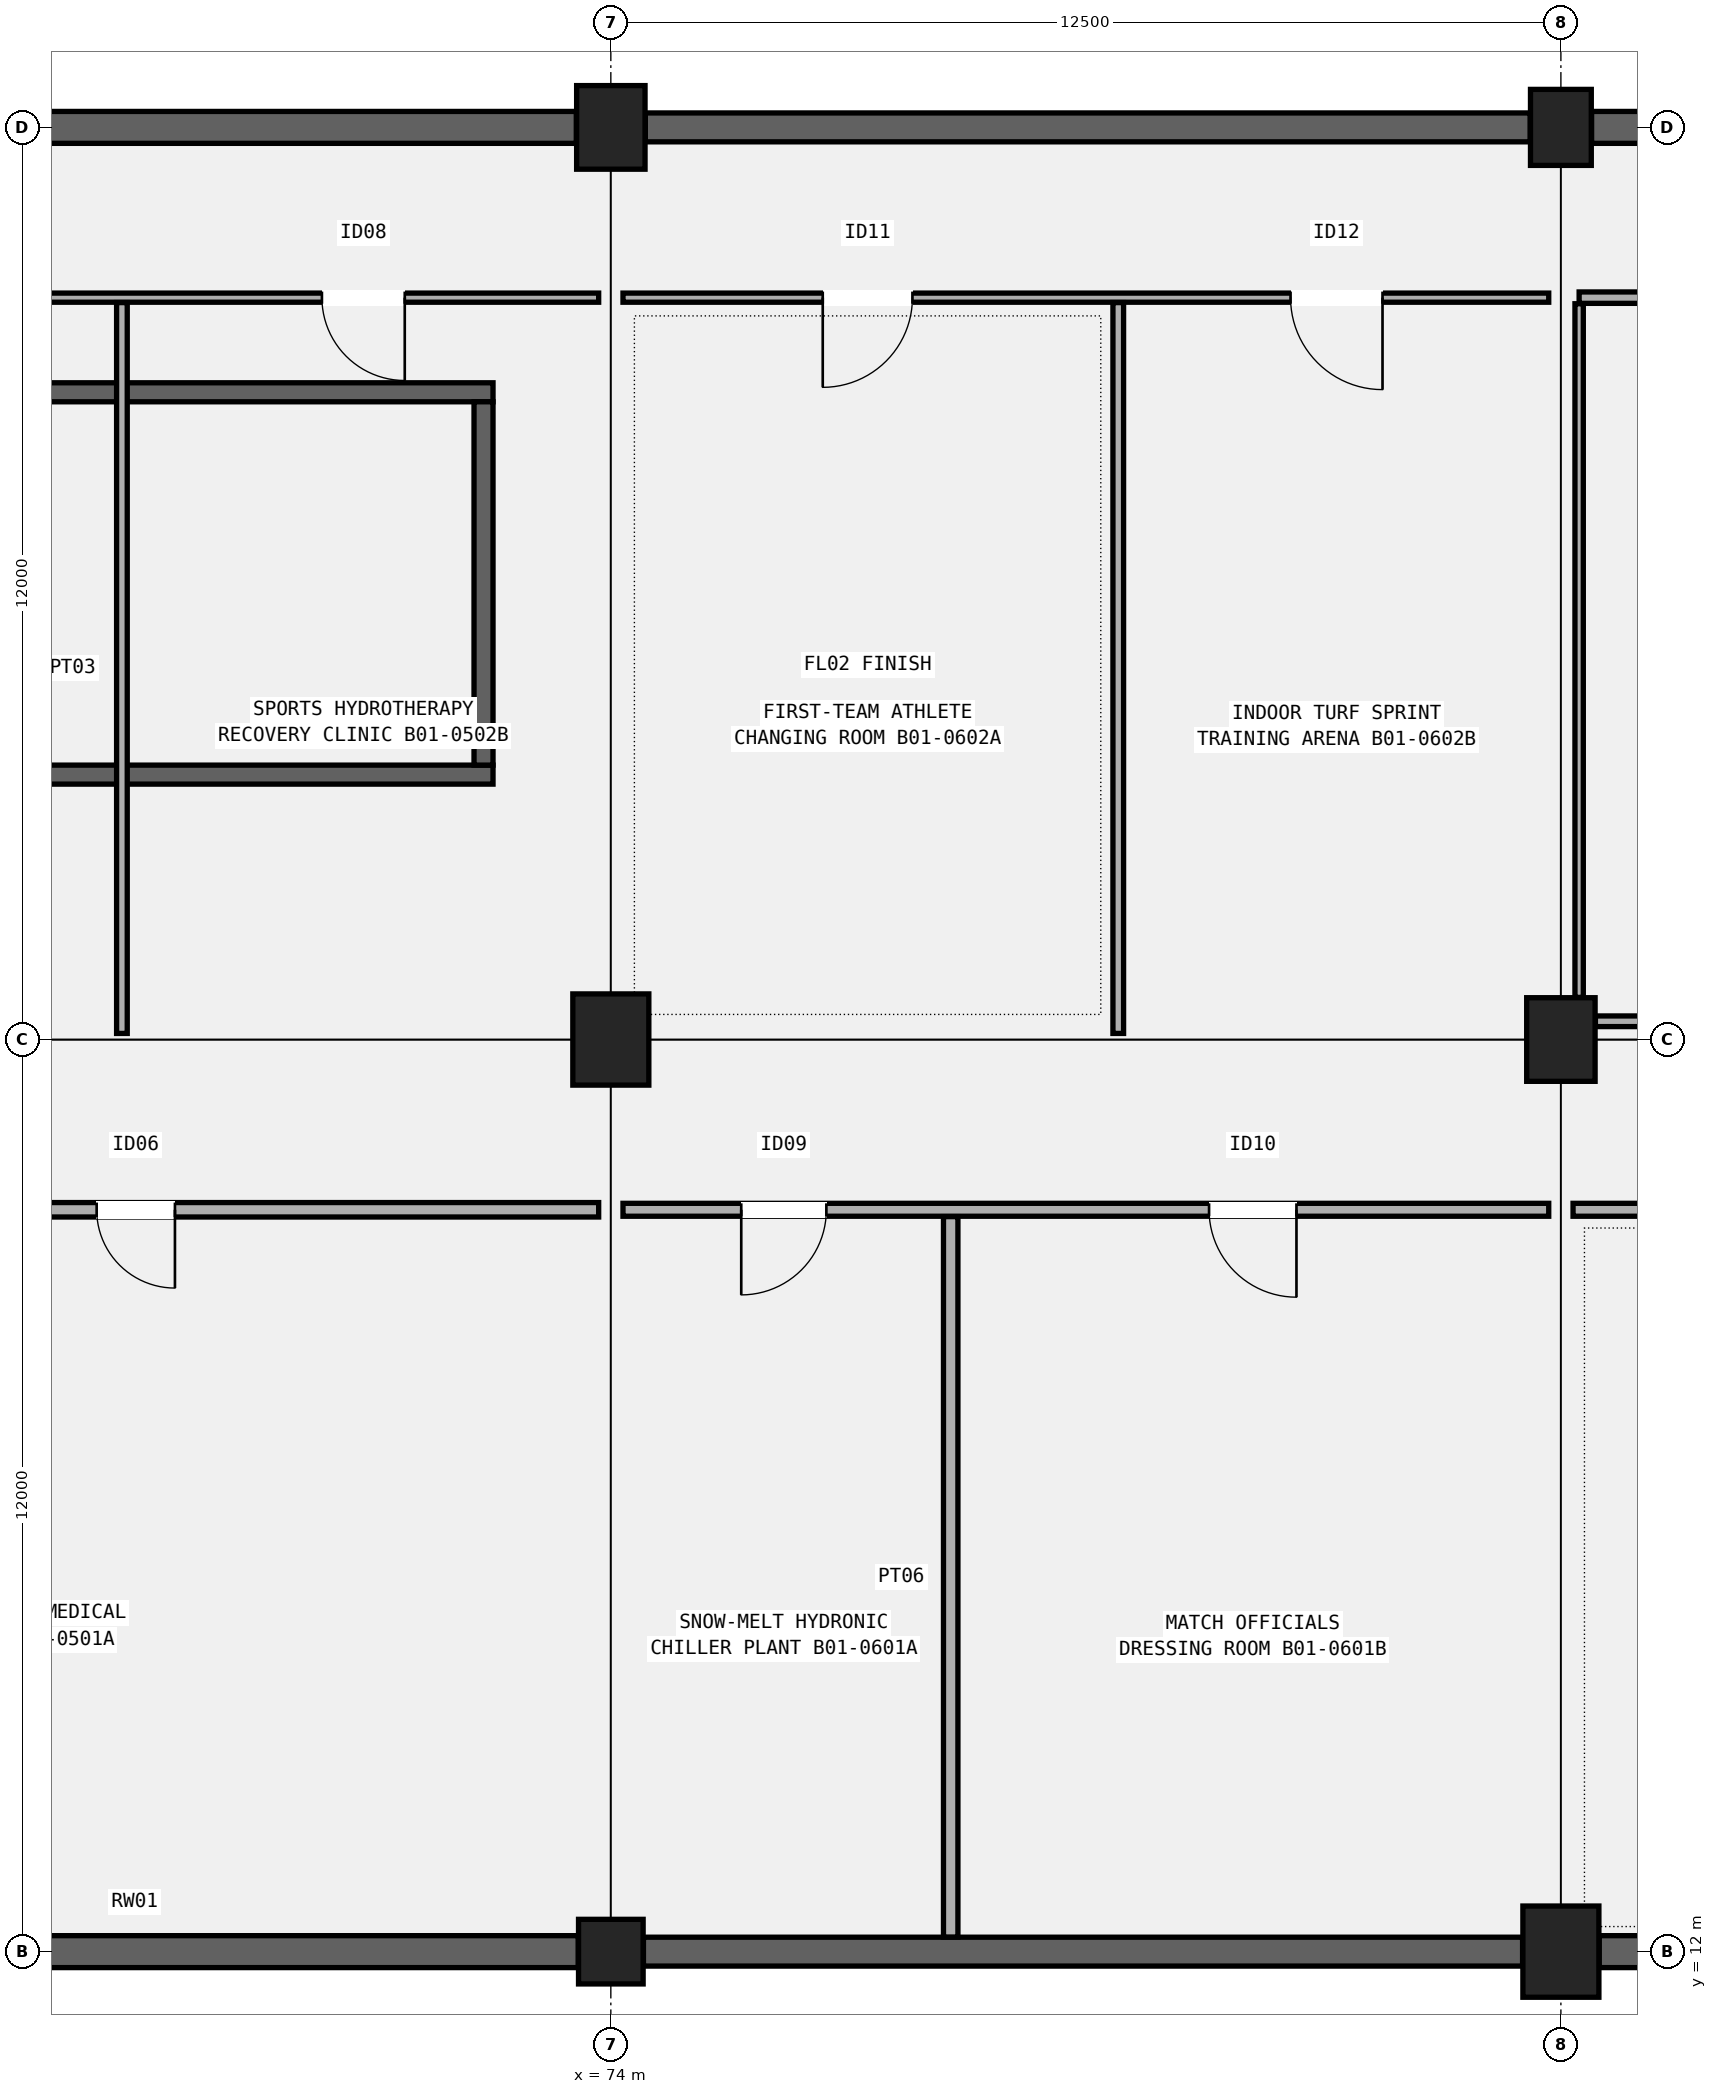
"""IFC4 building model, lengths in metres.
Left out: names, types, materials, properties, quantities, classifications, styles, units other than length and angle.
Written with IfcOpenShell. Run it as: python <this file> out.ifc"""

import sys

from ifc_helpers import new_model, si_unit, direction, frame, frame_2d, origin, origin_2d, place, context, subcontext, project, spatial, rectangle, circle, extrude, element, fill, save


model = new_model("IFC4")
c1 = context("Model", 3, precision=1e-05, world=origin(), true_north=direction((0.0, 1.0)))
c2 = subcontext(c1, "Body", "Model", "MODEL_VIEW")
j1 = project(units=[si_unit("LENGTHUNIT", "METRE"), si_unit("PLANEANGLEUNIT", "RADIAN")], contexts=[c1])
p1 = place(None, origin())
s1 = spatial("IfcSite", under=j1, at=p1, CompositionType="ELEMENT")
p2 = place(p1, origin())
s2 = spatial("IfcBuilding", under=s1, at=p2, CompositionType="ELEMENT")
p3 = place(p2, frame((0.0, 0.0, -4.8)))
s3 = spatial("IfcBuildingStorey", under=s2, at=p3, CompositionType="ELEMENT", Elevation=-4.8)
p4 = place(p3, frame((74.0, 12.0, 0.0), z_axis=(0.0, 0.0, 1.0), x_axis=(1.0, 0.0, 0.0)))
e1 = element("IfcColumn", 1, at=p4, inside=s3, PredefinedType="COLUMN", context=c2, shape_type="SweptSolid", body=[
    extrude(circle(Radius=0.425, at=origin_2d()), origin(), (0.0, 0.0, 1.0), 4.8),
])
p5 = place(p3, frame((74.0, 24.0, 0.0), z_axis=(0.0, 0.0, 1.0), x_axis=(1.0, 0.0, 0.0)))
e2 = element("IfcColumn", 2, at=p5, inside=s3, PredefinedType="COLUMN", context=c2, shape_type="SweptSolid", body=[
    extrude(rectangle(XDim=1.0, YDim=1.2, at=origin_2d()), origin(), (0.0, 0.0, 1.0), 4.8),
])
p6 = place(p3, frame((74.0, 36.0, 0.0), z_axis=(0.0, 0.0, 1.0), x_axis=(1.0, 0.0, 0.0)))
e3 = element("IfcColumn", 3, at=p6, inside=s3, PredefinedType="COLUMN", context=c2, shape_type="SweptSolid", body=[
    extrude(rectangle(XDim=0.9, YDim=1.1, at=origin_2d()), origin(), (0.0, 0.0, 1.0), 4.8),
])
p7 = place(p3, frame((86.5, 12.0, 0.0), z_axis=(0.0, 0.0, 1.0), x_axis=(1.0, 0.0, 0.0)))
e4 = element("IfcColumn", 4, at=p7, inside=s3, PredefinedType="COLUMN", context=c2, shape_type="SweptSolid", body=[
    extrude(rectangle(XDim=1.0, YDim=1.2, at=origin_2d()), origin(), (0.0, 0.0, 1.0), 4.8),
])
p8 = place(p3, frame((86.5, 24.0, 0.0), z_axis=(0.0, 0.0, 1.0), x_axis=(1.0, 0.0, 0.0)))
e5 = element("IfcColumn", 5, at=p8, inside=s3, PredefinedType="COLUMN", context=c2, shape_type="SweptSolid", body=[
    extrude(rectangle(XDim=0.9, YDim=1.1, at=origin_2d()), origin(), (0.0, 0.0, 1.0), 4.8),
])
p9 = place(p3, frame((86.5, 36.0, 0.0), z_axis=(0.0, 0.0, 1.0), x_axis=(1.0, 0.0, 0.0)))
e6 = element("IfcColumn", 6, at=p9, inside=s3, PredefinedType="COLUMN", context=c2, shape_type="SweptSolid", body=[
    extrude(rectangle(XDim=0.8, YDim=1.0, at=origin_2d()), origin(), (0.0, 0.0, 1.0), 4.8),
])
p10 = place(p3, frame((61.904, 12.0, 0.0), z_axis=(0.0, 0.0, 1.0), x_axis=(1.0, 0.0, 0.0)))
e7 = element("IfcWall", 7, at=p10, inside=s3, PredefinedType="STANDARD", context=c2, shape_type="SweptSolid", body=[
    extrude(rectangle(XDim=11.667, YDim=0.42, at=frame_2d((5.833, 0.0))), origin(), (0.0, 0.0, 1.0), 4.46),
])
p11 = place(p3, frame((62.004, 36.0, 0.0), z_axis=(0.0, 0.0, 1.0), x_axis=(1.0, 0.0, 0.0)))
e8 = element("IfcWall", 8, at=p11, inside=s3, PredefinedType="STANDARD", context=c2, shape_type="SweptSolid", body=[
    extrude(rectangle(XDim=11.542, YDim=0.42, at=frame_2d((5.771, 0.0))), origin(), (0.0, 0.0, 1.0), 4.46),
])
p12 = place(p3, frame((74.429, 12.0, 0.0), z_axis=(0.0, 0.0, 1.0), x_axis=(1.0, 0.0, 0.0)))
e9 = element("IfcWall", 9, at=p12, inside=s3, PredefinedType="STANDARD", context=c2, shape_type="SweptSolid", body=[
    extrude(rectangle(XDim=11.567, YDim=0.38, at=frame_2d((5.784, 0.0))), origin(), (0.0, 0.0, 1.0), 4.46),
])
p13 = place(p3, frame((74.454, 36.0, 0.0), z_axis=(0.0, 0.0, 1.0), x_axis=(1.0, 0.0, 0.0)))
e10 = element("IfcWall", 10, at=p13, inside=s3, PredefinedType="STANDARD", context=c2, shape_type="SweptSolid", body=[
    extrude(rectangle(XDim=11.642, YDim=0.38, at=frame_2d((5.821, 0.0))), origin(), (0.0, 0.0, 1.0), 4.46),
])
p14 = place(p3, frame((87.004, 12.0, 0.0), z_axis=(0.0, 0.0, 1.0), x_axis=(1.0, 0.0, 0.0)))
e11 = element("IfcWall", 11, at=p14, inside=s3, PredefinedType="STANDARD", context=c2, shape_type="SweptSolid", body=[
    extrude(rectangle(XDim=11.542, YDim=0.42, at=frame_2d((5.771, 0.0))), origin(), (0.0, 0.0, 1.0), 4.46),
])
p15 = place(p3, frame((86.904, 36.0, 0.0), z_axis=(0.0, 0.0, 1.0), x_axis=(1.0, 0.0, 0.0)))
e12 = element("IfcWall", 12, at=p15, inside=s3, PredefinedType="STANDARD", context=c2, shape_type="SweptSolid", body=[
    extrude(rectangle(XDim=11.667, YDim=0.42, at=frame_2d((5.833, 0.0))), origin(), (0.0, 0.0, 1.0), 4.46),
])
for number, where, z_axis, x_axis in (
    (13, (63.05, 27.485, 0.0), (0.0, 0.0, 1.0), (1.0, 0.0, 0.0)),
    (14, (63.05, 32.515, 0.0), (0.0, 0.0, 1.0), (1.0, 0.0, 0.0)),
):
    element("IfcWall", number, at=place(p3, frame(where, z_axis=z_axis, x_axis=x_axis)), inside=s3, PredefinedType="SHEAR", context=c2, shape_type="SweptSolid", body=[
        extrude(rectangle(XDim=9.4, YDim=0.25, at=frame_2d((4.7, 0.0))), origin(), (0.0, 0.0, 1.0), 4.5),
    ])
p16 = place(p3, frame((72.325, 27.61, 0.0), z_axis=(0.0, 0.0, 1.0), x_axis=(0.0, 1.0, 0.0)))
e15 = element("IfcWall", 15, at=p16, inside=s3, PredefinedType="SHEAR", context=c2, shape_type="SweptSolid", body=[
    extrude(rectangle(XDim=4.78, YDim=0.25, at=frame_2d((2.39, 0.0))), origin(), (0.0, 0.0, 1.0), 4.5),
])
p17 = place(p3, frame((61.66, 21.76, 0.0), z_axis=(0.0, 0.0, 1.0), x_axis=(1.0, 0.0, 0.0)))
e16 = element("IfcWall", 16, at=p17, inside=s3, PredefinedType="PARTITIONING", context=c2, shape_type="SweptSolid", body=[
    extrude(rectangle(XDim=12.18, YDim=0.19, at=frame_2d((6.09, 0.0))), origin(), (0.0, 0.0, 1.0), 3.92),
])
p18 = place(p17, frame((6.605, 0.0, 0.0), z_axis=(0.0, 0.0, 1.0), x_axis=(-1.0, 0.0, 0.0)))
e17 = element("IfcOpeningElement", 17, at=p18, cuts=e16, PredefinedType="OPENING", context=c2, shape_type="SweptSolid", body=[
    extrude(rectangle(XDim=1.03, YDim=2.12, at=frame_2d((0.515, 1.06))), frame((0.0, 0.105, 0.0), z_axis=(0.0, -1.0, 0.0), x_axis=(1.0, 0.0, 0.0)), (0.0, 0.0, 1.0), 0.21),
])
p19 = place(p3, frame((61.66, 33.76, 0.0), z_axis=(0.0, 0.0, 1.0), x_axis=(1.0, 0.0, 0.0)))
e18 = element("IfcWall", 18, at=p19, inside=s3, PredefinedType="PARTITIONING", context=c2, shape_type="SweptSolid", body=[
    extrude(rectangle(XDim=12.18, YDim=0.12, at=frame_2d((6.09, 0.0))), origin(), (0.0, 0.0, 1.0), 3.92),
])
p20 = place(p19, frame((3.444, 0.0, 0.0), z_axis=(0.0, 0.0, 1.0), x_axis=(-1.0, 0.0, 0.0)))
e19 = element("IfcOpeningElement", 19, at=p20, cuts=e18, PredefinedType="OPENING", context=c2, shape_type="SweptSolid", body=[
    extrude(rectangle(XDim=1.06, YDim=2.15, at=frame_2d((0.53, 1.075))), frame((0.0, 0.07, 0.0), z_axis=(0.0, -1.0, 0.0), x_axis=(1.0, 0.0, 0.0)), (0.0, 0.0, 1.0), 0.14),
])
p21 = place(p19, frame((9.629, 0.0, 0.0), z_axis=(0.0, 0.0, 1.0), x_axis=(-1.0, 0.0, 0.0)))
e20 = element("IfcOpeningElement", 20, at=p21, cuts=e18, PredefinedType="OPENING", context=c2, shape_type="SweptSolid", body=[
    extrude(rectangle(XDim=1.09, YDim=2.16, at=frame_2d((0.545, 1.08))), frame((0.0, 0.07, 0.0), z_axis=(0.0, -1.0, 0.0), x_axis=(1.0, 0.0, 0.0)), (0.0, 0.0, 1.0), 0.14),
])
p22 = place(p3, frame((67.567, 24.08, 0.0), z_axis=(0.0, 0.0, 1.0), x_axis=(0.0, 1.0, 0.0)))
e21 = element("IfcWall", 21, at=p22, inside=s3, PredefinedType="PARTITIONING", context=c2, shape_type="SweptSolid", body=[
    extrude(rectangle(XDim=9.615, YDim=0.14, at=frame_2d((4.808, 0.0))), origin(), (0.0, 0.0, 1.0), 3.92),
])
p23 = place(p3, frame((74.16, 21.76, 0.0), z_axis=(0.0, 0.0, 1.0), x_axis=(1.0, 0.0, 0.0)))
e22 = element("IfcWall", 22, at=p23, inside=s3, PredefinedType="PARTITIONING", context=c2, shape_type="SweptSolid", body=[
    extrude(rectangle(XDim=12.18, YDim=0.17, at=frame_2d((6.09, 0.0))), origin(), (0.0, 0.0, 1.0), 3.92),
])
p24 = place(p23, frame((2.676, 0.0, 0.0), z_axis=(0.0, 0.0, 1.0), x_axis=(-1.0, 0.0, 0.0)))
e23 = element("IfcOpeningElement", 23, at=p24, cuts=e22, PredefinedType="OPENING", context=c2, shape_type="SweptSolid", body=[
    extrude(rectangle(XDim=1.12, YDim=2.18, at=frame_2d((0.56, 1.09))), frame((0.0, 0.095, 0.0), z_axis=(0.0, -1.0, 0.0), x_axis=(1.0, 0.0, 0.0)), (0.0, 0.0, 1.0), 0.19),
])
p25 = place(p23, frame((8.861, 0.0, 0.0), z_axis=(0.0, 0.0, 1.0), x_axis=(-1.0, 0.0, 0.0)))
e24 = element("IfcOpeningElement", 24, at=p25, cuts=e22, PredefinedType="OPENING", context=c2, shape_type="SweptSolid", body=[
    extrude(rectangle(XDim=1.15, YDim=2.15, at=frame_2d((0.575, 1.075))), frame((0.0, 0.095, 0.0), z_axis=(0.0, -1.0, 0.0), x_axis=(1.0, 0.0, 0.0)), (0.0, 0.0, 1.0), 0.19),
])
p26 = place(p3, frame((78.472, 12.192, 0.0), z_axis=(0.0, 0.0, 1.0), x_axis=(0.0, 1.0, 0.0)))
e25 = element("IfcWall", 25, at=p26, inside=s3, PredefinedType="PARTITIONING", context=c2, shape_type="SweptSolid", body=[
    extrude(rectangle(XDim=9.478, YDim=0.19, at=frame_2d((4.739, 0.0))), origin(), (0.0, 0.0, 1.0), 3.92),
])
p27 = place(p3, frame((74.16, 33.76, 0.0), z_axis=(0.0, 0.0, 1.0), x_axis=(1.0, 0.0, 0.0)))
e26 = element("IfcWall", 26, at=p27, inside=s3, PredefinedType="PARTITIONING", context=c2, shape_type="SweptSolid", body=[
    extrude(rectangle(XDim=12.18, YDim=0.12, at=frame_2d((6.09, 0.0))), origin(), (0.0, 0.0, 1.0), 3.92),
])
p28 = place(p27, frame((3.808, 0.0, 0.0), z_axis=(0.0, 0.0, 1.0), x_axis=(-1.0, 0.0, 0.0)))
e27 = element("IfcOpeningElement", 27, at=p28, cuts=e26, PredefinedType="OPENING", context=c2, shape_type="SweptSolid", body=[
    extrude(rectangle(XDim=1.18, YDim=2.2, at=frame_2d((0.59, 1.1))), frame((0.0, 0.07, 0.0), z_axis=(0.0, -1.0, 0.0), x_axis=(1.0, 0.0, 0.0)), (0.0, 0.0, 1.0), 0.14),
])
p29 = place(p27, frame((9.993, 0.0, 0.0), z_axis=(0.0, 0.0, 1.0), x_axis=(-1.0, 0.0, 0.0)))
e28 = element("IfcOpeningElement", 28, at=p29, cuts=e26, PredefinedType="OPENING", context=c2, shape_type="SweptSolid", body=[
    extrude(rectangle(XDim=1.21, YDim=2.18, at=frame_2d((0.605, 1.09))), frame((0.0, 0.07, 0.0), z_axis=(0.0, -1.0, 0.0), x_axis=(1.0, 0.0, 0.0)), (0.0, 0.0, 1.0), 0.14),
])
p30 = place(p3, frame((80.676, 24.08, 0.0), z_axis=(0.0, 0.0, 1.0), x_axis=(0.0, 1.0, 0.0)))
e29 = element("IfcWall", 29, at=p30, inside=s3, PredefinedType="PARTITIONING", context=c2, shape_type="SweptSolid", body=[
    extrude(rectangle(XDim=9.615, YDim=0.14, at=frame_2d((4.808, 0.0))), origin(), (0.0, 0.0, 1.0), 3.92),
])
p31 = place(p3, frame((86.66, 21.76, 0.0), z_axis=(0.0, 0.0, 1.0), x_axis=(1.0, 0.0, 0.0)))
e30 = element("IfcWall", 30, at=p31, inside=s3, PredefinedType="PARTITIONING", context=c2, shape_type="SweptSolid", body=[
    extrude(rectangle(XDim=12.18, YDim=0.17, at=frame_2d((6.09, 0.0))), origin(), (0.0, 0.0, 1.0), 3.92),
])
p32 = place(p31, frame((6.71, 0.0, 0.0), z_axis=(0.0, 0.0, 1.0), x_axis=(-1.0, 0.0, 0.0)))
e31 = element("IfcOpeningElement", 31, at=p32, cuts=e30, PredefinedType="OPENING", context=c2, shape_type="SweptSolid", body=[
    extrude(rectangle(XDim=1.24, YDim=2.22, at=frame_2d((0.62, 1.11))), frame((0.0, 0.095, 0.0), z_axis=(0.0, -1.0, 0.0), x_axis=(1.0, 0.0, 0.0)), (0.0, 0.0, 1.0), 0.19),
])
p33 = place(p3, frame((86.74, 33.76, 0.0), z_axis=(0.0, 0.0, 1.0), x_axis=(1.0, 0.0, 0.0)))
e32 = element("IfcWall", 32, at=p33, inside=s3, PredefinedType="PARTITIONING", context=c2, shape_type="SweptSolid", body=[
    extrude(rectangle(XDim=12.02, YDim=0.15, at=frame_2d((6.01, 0.0))), origin(), (0.0, 0.0, 1.0), 3.92),
])
p34 = place(p33, frame((2.066, 0.0, 0.0), z_axis=(0.0, 0.0, 1.0), x_axis=(-1.0, 0.0, 0.0)))
e33 = element("IfcOpeningElement", 33, at=p34, cuts=e32, PredefinedType="OPENING", context=c2, shape_type="SweptSolid", body=[
    extrude(rectangle(XDim=1.27, YDim=2.2, at=frame_2d((0.635, 1.1))), frame((0.0, 0.085, 0.0), z_axis=(0.0, -1.0, 0.0), x_axis=(1.0, 0.0, 0.0)), (0.0, 0.0, 1.0), 0.17),
])
p35 = place(p33, frame((5.802, 0.0, 0.0), z_axis=(0.0, 0.0, 1.0), x_axis=(-1.0, 0.0, 0.0)))
e34 = element("IfcOpeningElement", 34, at=p35, cuts=e32, PredefinedType="OPENING", context=c2, shape_type="SweptSolid", body=[
    extrude(rectangle(XDim=1.3, YDim=2.24, at=frame_2d((0.65, 1.12))), frame((0.0, 0.085, 0.0), z_axis=(0.0, -1.0, 0.0), x_axis=(1.0, 0.0, 0.0)), (0.0, 0.0, 1.0), 0.17),
])
p36 = place(p33, frame((10.396, 0.0, 0.0), z_axis=(0.0, 0.0, 1.0), x_axis=(-1.0, 0.0, 0.0)))
e35 = element("IfcOpeningElement", 35, at=p36, cuts=e32, PredefinedType="OPENING", context=c2, shape_type="SweptSolid", body=[
    extrude(rectangle(XDim=1.33, YDim=2.22, at=frame_2d((0.665, 1.11))), frame((0.0, 0.085, 0.0), z_axis=(0.0, -1.0, 0.0), x_axis=(1.0, 0.0, 0.0)), (0.0, 0.0, 1.0), 0.17),
])
p37 = place(p3, frame((86.74, 24.554, 0.0), z_axis=(0.0, 0.0, 1.0), x_axis=(0.0, 1.0, 0.0)))
e36 = element("IfcWall", 36, at=p37, inside=s3, PredefinedType="PARTITIONING", context=c2, shape_type="SweptSolid", body=[
    extrude(rectangle(XDim=9.126, YDim=0.11, at=frame_2d((4.563, 0.0))), origin(), (0.0, 0.0, 1.0), 3.52),
])
p38 = place(p3, frame((86.954, 24.24, 0.0), z_axis=(0.0, 0.0, 1.0), x_axis=(1.0, 0.0, 0.0)))
e37 = element("IfcWall", 37, at=p38, inside=s3, PredefinedType="PARTITIONING", context=c2, shape_type="SweptSolid", body=[
    extrude(rectangle(XDim=11.642, YDim=0.14, at=frame_2d((5.821, 0.0))), origin(), (0.0, 0.0, 1.0), 3.52),
])
p39 = place(p18, origin())
e38 = element("IfcDoor", 38, at=p39, inside=s3, OperationType="SINGLE_SWING_LEFT", PredefinedType="DOOR", context=c2, shape_type="SweptSolid", body=[
    extrude(rectangle(XDim=1.03, YDim=2.12, at=frame_2d((0.515, 1.06))), frame((0.0, 0.025, 0.0), z_axis=(0.0, -1.0, 0.0), x_axis=(1.0, 0.0, 0.0)), (0.0, 0.0, 1.0), 0.05),
])
fill(e17, e38)
p40 = place(p21, origin())
e39 = element("IfcDoor", 39, at=p40, inside=s3, OperationType="SINGLE_SWING_LEFT", PredefinedType="DOOR", context=c2, shape_type="SweptSolid", body=[
    extrude(rectangle(XDim=1.09, YDim=2.16, at=frame_2d((0.545, 1.08))), frame((0.0, 0.025, 0.0), z_axis=(0.0, -1.0, 0.0), x_axis=(1.0, 0.0, 0.0)), (0.0, 0.0, 1.0), 0.05),
])
fill(e20, e39)
p41 = place(p24, origin())
e40 = element("IfcDoor", 40, at=p41, inside=s3, OperationType="SINGLE_SWING_RIGHT", PredefinedType="DOOR", context=c2, shape_type="SweptSolid", body=[
    extrude(rectangle(XDim=1.12, YDim=2.18, at=frame_2d((0.56, 1.09))), frame((0.0, 0.025, 0.0), z_axis=(0.0, -1.0, 0.0), x_axis=(1.0, 0.0, 0.0)), (0.0, 0.0, 1.0), 0.05),
])
fill(e23, e40)
p42 = place(p25, origin())
e41 = element("IfcDoor", 41, at=p42, inside=s3, OperationType="SINGLE_SWING_LEFT", PredefinedType="DOOR", context=c2, shape_type="SweptSolid", body=[
    extrude(rectangle(XDim=1.15, YDim=2.15, at=frame_2d((0.575, 1.075))), frame((0.0, 0.025, 0.0), z_axis=(0.0, -1.0, 0.0), x_axis=(1.0, 0.0, 0.0)), (0.0, 0.0, 1.0), 0.05),
])
fill(e24, e41)
p43 = place(p28, origin())
e42 = element("IfcDoor", 42, at=p43, inside=s3, OperationType="SINGLE_SWING_RIGHT", PredefinedType="DOOR", context=c2, shape_type="SweptSolid", body=[
    extrude(rectangle(XDim=1.18, YDim=2.2, at=frame_2d((0.59, 1.1))), frame((0.0, 0.025, 0.0), z_axis=(0.0, -1.0, 0.0), x_axis=(1.0, 0.0, 0.0)), (0.0, 0.0, 1.0), 0.05),
])
fill(e27, e42)
p44 = place(p29, origin())
e43 = element("IfcDoor", 43, at=p44, inside=s3, OperationType="SINGLE_SWING_LEFT", PredefinedType="DOOR", context=c2, shape_type="SweptSolid", body=[
    extrude(rectangle(XDim=1.21, YDim=2.18, at=frame_2d((0.605, 1.09))), frame((0.0, 0.025, 0.0), z_axis=(0.0, -1.0, 0.0), x_axis=(1.0, 0.0, 0.0)), (0.0, 0.0, 1.0), 0.05),
])
fill(e28, e43)
save(model, sys.argv[1])
